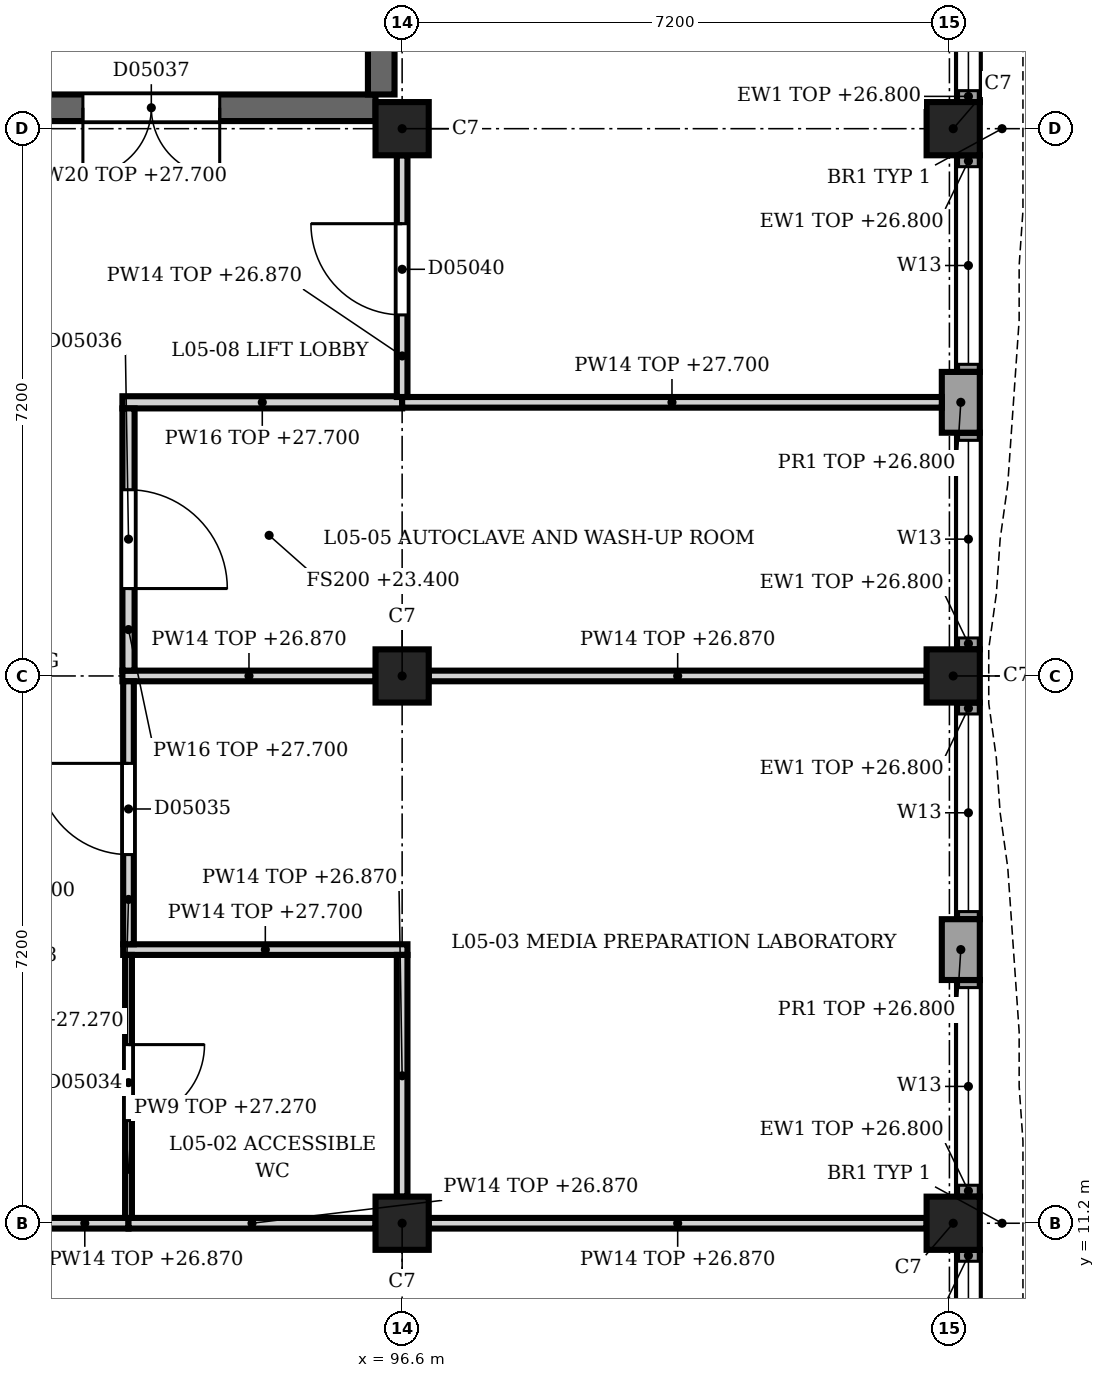
"""IFC4 building model, lengths in metres.
Left out: names, types, materials, properties, quantities, classifications, styles, units other than length and angle.
Written with IfcOpenShell. Run it as: python <this file> out.ifc"""

import sys

from ifc_helpers import new_model, si_unit, direction, frame, frame_2d, origin, origin_2d, place, context, subcontext, project, spatial, rectangle, extrude, element, fill, save


model = new_model("IFC4")
c1 = context("Model", 3, precision=1e-05, world=origin(), true_north=direction((0.0, 1.0)))
c2 = subcontext(c1, "Body", "Model", "MODEL_VIEW")
j1 = project(units=[si_unit("LENGTHUNIT", "METRE"), si_unit("PLANEANGLEUNIT", "RADIAN")], contexts=[c1])
p1 = place(None, origin())
s1 = spatial("IfcSite", under=j1, at=p1, CompositionType="ELEMENT")
p2 = place(p1, origin())
s2 = spatial("IfcBuilding", under=s1, at=p2, CompositionType="ELEMENT")
p3 = place(p2, frame((0.0, 0.0, 23.4)))
s3 = spatial("IfcBuildingStorey", under=s2, at=p3, CompositionType="ELEMENT", Elevation=23.4)
for number, where, z_axis, x_axis in (
    (1, (96.6, 11.2, 0.0), (0.0, 0.0, 1.0), (1.0, 0.0, 0.0)),
    (2, (96.6, 18.4, 0.0), (0.0, 0.0, 1.0), (1.0, 0.0, 0.0)),
    (3, (96.6, 25.6, 0.0), (0.0, 0.0, 1.0), (1.0, 0.0, 0.0)),
    (4, (103.85, 11.2, 0.0), (0.0, 0.0, 1.0), (1.0, 0.0, 0.0)),
    (5, (103.85, 18.4, 0.0), (0.0, 0.0, 1.0), (1.0, 0.0, 0.0)),
    (6, (103.85, 25.6, 0.0), (0.0, 0.0, 1.0), (1.0, 0.0, 0.0)),
):
    element("IfcColumn", number, at=place(p3, frame(where, z_axis=z_axis, x_axis=x_axis)), inside=s3, PredefinedType="COLUMN", context=c2, shape_type="SweptSolid", body=[
        extrude(rectangle(XDim=0.7, YDim=0.7, at=origin_2d()), origin(), (0.0, 0.0, 1.0), 4.5),
    ])
p4 = place(p3, frame((103.95, 22.4, 0.0), z_axis=(0.0, 0.0, 1.0), x_axis=(0.0, -1.0, 0.0)))
e7 = element("IfcWall", 7, at=p4, inside=s3, PredefinedType="SOLIDWALL", context=c2, shape_type="SweptSolid", body=[
    extrude(rectangle(XDim=0.8, YDim=0.5, at=frame_2d((0.4, 0.0))), origin(), (0.0, 0.0, 1.0), 3.4),
])
p5 = place(p3, frame((103.95, 15.2, 0.0), z_axis=(0.0, 0.0, 1.0), x_axis=(0.0, -1.0, 0.0)))
e8 = element("IfcWall", 8, at=p5, inside=s3, PredefinedType="SOLIDWALL", context=c2, shape_type="SweptSolid", body=[
    extrude(rectangle(XDim=0.8, YDim=0.5, at=frame_2d((0.4, 0.0))), origin(), (0.0, 0.0, 1.0), 3.4),
])
p6 = place(p3, frame((104.05, 28.8, 0.0), z_axis=(0.0, 0.0, 1.0), x_axis=(0.0, -1.0, 0.0)))
e9 = element("IfcWall", 9, at=p6, inside=s3, PredefinedType="SOLIDWALL", context=c2, shape_type="SweptSolid", body=[
    extrude(rectangle(XDim=2.85, YDim=0.3, at=frame_2d((1.425, 0.0))), origin(), (0.0, 0.0, 1.0), 3.4),
])
p7 = place(p6, frame((0.1, 0.0, 0.9)))
e10 = element("IfcOpeningElement", 10, at=p7, cuts=e9, PredefinedType="OPENING", context=c2, shape_type="SweptSolid", body=[
    extrude(rectangle(XDim=2.6, YDim=2.2, at=frame_2d((1.3, 1.1))), frame((0.0, 0.16, 0.0), z_axis=(0.0, -1.0, 0.0), x_axis=(1.0, 0.0, 0.0)), (0.0, 0.0, 1.0), 0.32),
])
p8 = place(p3, frame((104.05, 25.25, 0.0), z_axis=(0.0, 0.0, 1.0), x_axis=(0.0, -1.0, 0.0)))
e11 = element("IfcWall", 11, at=p8, inside=s3, PredefinedType="SOLIDWALL", context=c2, shape_type="SweptSolid", body=[
    extrude(rectangle(XDim=2.85, YDim=0.3, at=frame_2d((1.425, 0.0))), origin(), (0.0, 0.0, 1.0), 3.4),
])
p9 = place(p8, frame((0.15, 0.0, 0.9)))
e12 = element("IfcOpeningElement", 12, at=p9, cuts=e11, PredefinedType="OPENING", context=c2, shape_type="SweptSolid", body=[
    extrude(rectangle(XDim=2.6, YDim=2.2, at=frame_2d((1.3, 1.1))), frame((0.0, 0.16, 0.0), z_axis=(0.0, -1.0, 0.0), x_axis=(1.0, 0.0, 0.0)), (0.0, 0.0, 1.0), 0.32),
])
p10 = place(p3, frame((104.05, 21.6, 0.0), z_axis=(0.0, 0.0, 1.0), x_axis=(0.0, -1.0, 0.0)))
e13 = element("IfcWall", 13, at=p10, inside=s3, PredefinedType="SOLIDWALL", context=c2, shape_type="SweptSolid", body=[
    extrude(rectangle(XDim=2.85, YDim=0.3, at=frame_2d((1.425, 0.0))), origin(), (0.0, 0.0, 1.0), 3.4),
])
p11 = place(p10, frame((0.1, 0.0, 0.9)))
e14 = element("IfcOpeningElement", 14, at=p11, cuts=e13, PredefinedType="OPENING", context=c2, shape_type="SweptSolid", body=[
    extrude(rectangle(XDim=2.6, YDim=2.2, at=frame_2d((1.3, 1.1))), frame((0.0, 0.16, 0.0), z_axis=(0.0, -1.0, 0.0), x_axis=(1.0, 0.0, 0.0)), (0.0, 0.0, 1.0), 0.32),
])
p12 = place(p3, frame((104.05, 18.05, 0.0), z_axis=(0.0, 0.0, 1.0), x_axis=(0.0, -1.0, 0.0)))
e15 = element("IfcWall", 15, at=p12, inside=s3, PredefinedType="SOLIDWALL", context=c2, shape_type="SweptSolid", body=[
    extrude(rectangle(XDim=2.85, YDim=0.3, at=frame_2d((1.425, 0.0))), origin(), (0.0, 0.0, 1.0), 3.4),
])
p13 = place(p12, frame((0.15, 0.0, 0.9)))
e16 = element("IfcOpeningElement", 16, at=p13, cuts=e15, PredefinedType="OPENING", context=c2, shape_type="SweptSolid", body=[
    extrude(rectangle(XDim=2.6, YDim=2.2, at=frame_2d((1.3, 1.1))), frame((0.0, 0.16, 0.0), z_axis=(0.0, -1.0, 0.0), x_axis=(1.0, 0.0, 0.0)), (0.0, 0.0, 1.0), 0.32),
])
p14 = place(p3, frame((104.05, 14.4, 0.0), z_axis=(0.0, 0.0, 1.0), x_axis=(0.0, -1.0, 0.0)))
e17 = element("IfcWall", 17, at=p14, inside=s3, PredefinedType="SOLIDWALL", context=c2, shape_type="SweptSolid", body=[
    extrude(rectangle(XDim=2.85, YDim=0.3, at=frame_2d((1.425, 0.0))), origin(), (0.0, 0.0, 1.0), 3.4),
])
p15 = place(p14, frame((0.1, 0.0, 0.9)))
e18 = element("IfcOpeningElement", 18, at=p15, cuts=e17, PredefinedType="OPENING", context=c2, shape_type="SweptSolid", body=[
    extrude(rectangle(XDim=2.6, YDim=2.2, at=frame_2d((1.3, 1.1))), frame((0.0, 0.16, 0.0), z_axis=(0.0, -1.0, 0.0), x_axis=(1.0, 0.0, 0.0)), (0.0, 0.0, 1.0), 0.32),
])
p16 = place(p3, frame((104.05, 10.85, 0.0), z_axis=(0.0, 0.0, 1.0), x_axis=(0.0, -1.0, 0.0)))
e19 = element("IfcWall", 19, at=p16, inside=s3, PredefinedType="SOLIDWALL", context=c2, shape_type="SweptSolid", body=[
    extrude(rectangle(XDim=2.85, YDim=0.3, at=frame_2d((1.425, 0.0))), origin(), (0.0, 0.0, 1.0), 3.4),
])
p17 = place(p16, frame((0.15, 0.0, 0.9)))
e20 = element("IfcOpeningElement", 20, at=p17, cuts=e19, PredefinedType="OPENING", context=c2, shape_type="SweptSolid", body=[
    extrude(rectangle(XDim=2.6, YDim=2.2, at=frame_2d((1.3, 1.1))), frame((0.0, 0.16, 0.0), z_axis=(0.0, -1.0, 0.0), x_axis=(1.0, 0.0, 0.0)), (0.0, 0.0, 1.0), 0.32),
])
p18 = place(p3, frame((89.75, 25.875, 0.0), z_axis=(0.0, 0.0, 1.0), x_axis=(1.0, 0.0, 0.0)))
e21 = element("IfcWall", 21, at=p18, inside=s3, PredefinedType="SHEAR", context=c2, shape_type="SweptSolid", body=[
    extrude(rectangle(XDim=6.5, YDim=0.35, at=frame_2d((3.25, 0.0))), origin(), (0.0, 0.0, 1.0), 4.3),
])
p19 = place(p18, frame((2.65, 0.0, 0.0)))
e22 = element("IfcOpeningElement", 22, at=p19, cuts=e21, PredefinedType="OPENING", context=c2, shape_type="SweptSolid", body=[
    extrude(rectangle(XDim=1.8, YDim=2.1, at=frame_2d((0.9, 1.05))), frame((0.0, 0.185, 0.0), z_axis=(0.0, -1.0, 0.0), x_axis=(1.0, 0.0, 0.0)), (0.0, 0.0, 1.0), 0.37),
])
p20 = place(p3, frame((96.325, 26.05, 0.0), z_axis=(0.0, 0.0, 1.0), x_axis=(0.0, 1.0, 0.0)))
e23 = element("IfcWall", 23, at=p20, inside=s3, PredefinedType="SHEAR", context=c2, shape_type="SweptSolid", body=[
    extrude(rectangle(XDim=6.3, YDim=0.35, at=frame_2d((3.15, 0.0))), origin(), (0.0, 0.0, 1.0), 4.3),
])
p21 = place(p3, frame((93.0, 11.2, 0.0), z_axis=(0.0, 0.0, 1.0), x_axis=(-1.0, 0.0, 0.0)))
e24 = element("IfcWall", 24, at=p21, inside=s3, PredefinedType="PARTITIONING", context=c2, shape_type="SweptSolid", body=[
    extrude(rectangle(XDim=3.25, YDim=0.14, at=frame_2d((1.625, 0.0))), origin(), (0.0, 0.0, 1.0), 3.47),
])
p22 = place(p21, frame((1.15, 0.0, 0.0)))
e25 = element("IfcOpeningElement", 25, at=p22, cuts=e24, PredefinedType="OPENING", context=c2, shape_type="SweptSolid", body=[
    extrude(rectangle(XDim=1.2, YDim=2.2, at=frame_2d((0.6, 1.1))), frame((0.0, 0.08, 0.0), z_axis=(0.0, -1.0, 0.0), x_axis=(1.0, 0.0, 0.0)), (0.0, 0.0, 1.0), 0.16),
])
p23 = place(p3, frame((93.0, 11.2, 0.0), z_axis=(0.0, 0.0, 1.0), x_axis=(1.0, 0.0, 0.0)))
e26 = element("IfcWall", 26, at=p23, inside=s3, PredefinedType="PARTITIONING", context=c2, shape_type="SweptSolid", body=[
    extrude(rectangle(XDim=3.25, YDim=0.14, at=frame_2d((1.625, 0.0))), origin(), (0.0, 0.0, 1.0), 3.47),
])
p24 = place(p3, frame((96.95, 11.2, 0.0), z_axis=(0.0, 0.0, 1.0), x_axis=(1.0, 0.0, 0.0)))
e27 = element("IfcWall", 27, at=p24, inside=s3, PredefinedType="PARTITIONING", context=c2, shape_type="SweptSolid", body=[
    extrude(rectangle(XDim=6.55, YDim=0.14, at=frame_2d((3.275, 0.0))), origin(), (0.0, 0.0, 1.0), 3.47),
])
p25 = place(p3, frame((92.93, 14.8, 0.0), z_axis=(0.0, 0.0, 1.0), x_axis=(1.0, 0.0, 0.0)))
e28 = element("IfcWall", 28, at=p25, inside=s3, PredefinedType="PARTITIONING", context=c2, shape_type="SweptSolid", body=[
    extrude(rectangle(XDim=3.74, YDim=0.14, at=frame_2d((1.87, 0.0))), origin(), (0.0, 0.0, 1.0), 4.3),
])
p26 = place(p3, frame((92.92, 18.4, 0.0), z_axis=(0.0, 0.0, 1.0), x_axis=(1.0, 0.0, 0.0)))
e29 = element("IfcWall", 29, at=p26, inside=s3, PredefinedType="PARTITIONING", context=c2, shape_type="SweptSolid", body=[
    extrude(rectangle(XDim=3.33, YDim=0.14, at=frame_2d((1.665, 0.0))), origin(), (0.0, 0.0, 1.0), 3.47),
])
p27 = place(p3, frame((96.95, 18.4, 0.0), z_axis=(0.0, 0.0, 1.0), x_axis=(1.0, 0.0, 0.0)))
e30 = element("IfcWall", 30, at=p27, inside=s3, PredefinedType="PARTITIONING", context=c2, shape_type="SweptSolid", body=[
    extrude(rectangle(XDim=6.55, YDim=0.14, at=frame_2d((3.275, 0.0))), origin(), (0.0, 0.0, 1.0), 3.47),
])
p28 = place(p3, frame((92.92, 22.0, 0.0), z_axis=(0.0, 0.0, 1.0), x_axis=(1.0, 0.0, 0.0)))
e31 = element("IfcWall", 31, at=p28, inside=s3, PredefinedType="PARTITIONING", context=c2, shape_type="SweptSolid", body=[
    extrude(rectangle(XDim=3.68, YDim=0.16, at=frame_2d((1.84, 0.0))), origin(), (0.0, 0.0, 1.0), 4.3),
])
p29 = place(p3, frame((96.6, 22.0, 0.0), z_axis=(0.0, 0.0, 1.0), x_axis=(1.0, 0.0, 0.0)))
e32 = element("IfcWall", 32, at=p29, inside=s3, PredefinedType="PARTITIONING", context=c2, shape_type="SweptSolid", body=[
    extrude(rectangle(XDim=7.1, YDim=0.14, at=frame_2d((3.55, 0.0))), origin(), (0.0, 0.0, 1.0), 4.3),
])
p30 = place(p3, frame((93.0, 14.73, 0.0), z_axis=(0.0, 0.0, 1.0), x_axis=(0.0, -1.0, 0.0)))
e33 = element("IfcWall", 33, at=p30, inside=s3, PredefinedType="PARTITIONING", context=c2, shape_type="SweptSolid", body=[
    extrude(rectangle(XDim=3.46, YDim=0.09, at=frame_2d((1.73, 0.0))), origin(), (0.0, 0.0, 1.0), 3.87),
])
p31 = place(p30, frame((1.18, 0.0, 0.0)))
e34 = element("IfcOpeningElement", 34, at=p31, cuts=e33, PredefinedType="OPENING", context=c2, shape_type="SweptSolid", body=[
    extrude(rectangle(XDim=1.0, YDim=2.2, at=frame_2d((0.5, 1.1))), frame((0.0, 0.055, 0.0), z_axis=(0.0, -1.0, 0.0), x_axis=(1.0, 0.0, 0.0)), (0.0, 0.0, 1.0), 0.11),
])
p32 = place(p3, frame((93.0, 18.33, 0.0), z_axis=(0.0, 0.0, 1.0), x_axis=(0.0, -1.0, 0.0)))
e35 = element("IfcWall", 35, at=p32, inside=s3, PredefinedType="PARTITIONING", context=c2, shape_type="SweptSolid", body=[
    extrude(rectangle(XDim=3.46, YDim=0.14, at=frame_2d((1.73, 0.0))), origin(), (0.0, 0.0, 1.0), 3.87),
])
p33 = place(p32, frame((1.08, 0.0, 0.0)))
e36 = element("IfcOpeningElement", 36, at=p33, cuts=e35, PredefinedType="OPENING", context=c2, shape_type="SweptSolid", body=[
    extrude(rectangle(XDim=1.2, YDim=2.1, at=frame_2d((0.6, 1.05))), frame((0.0, 0.08, 0.0), z_axis=(0.0, -1.0, 0.0), x_axis=(1.0, 0.0, 0.0)), (0.0, 0.0, 1.0), 0.16),
])
p34 = place(p3, frame((93.0, 21.92, 0.0), z_axis=(0.0, 0.0, 1.0), x_axis=(0.0, -1.0, 0.0)))
e37 = element("IfcWall", 37, at=p34, inside=s3, PredefinedType="PARTITIONING", context=c2, shape_type="SweptSolid", body=[
    extrude(rectangle(XDim=3.45, YDim=0.16, at=frame_2d((1.725, 0.0))), origin(), (0.0, 0.0, 1.0), 4.3),
])
p35 = place(p34, frame((1.07, 0.0, 0.0)))
e38 = element("IfcOpeningElement", 38, at=p35, cuts=e37, PredefinedType="OPENING", context=c2, shape_type="SweptSolid", body=[
    extrude(rectangle(XDim=1.3, YDim=2.2, at=frame_2d((0.65, 1.1))), frame((0.0, 0.09, 0.0), z_axis=(0.0, -1.0, 0.0), x_axis=(1.0, 0.0, 0.0)), (0.0, 0.0, 1.0), 0.18),
])
p36 = place(p3, frame((96.6, 11.55, 0.0), z_axis=(0.0, 0.0, 1.0), x_axis=(0.0, 1.0, 0.0)))
e39 = element("IfcWall", 39, at=p36, inside=s3, PredefinedType="PARTITIONING", context=c2, shape_type="SweptSolid", body=[
    extrude(rectangle(XDim=3.18, YDim=0.14, at=frame_2d((1.59, 0.0))), origin(), (0.0, 0.0, 1.0), 3.47),
])
p37 = place(p3, frame((96.6, 25.25, 0.0), z_axis=(0.0, 0.0, 1.0), x_axis=(0.0, -1.0, 0.0)))
e40 = element("IfcWall", 40, at=p37, inside=s3, PredefinedType="PARTITIONING", context=c2, shape_type="SweptSolid", body=[
    extrude(rectangle(XDim=3.18, YDim=0.14, at=frame_2d((1.59, 0.0))), origin(), (0.0, 0.0, 1.0), 3.47),
])
p38 = place(p37, frame((0.9, 0.0, 0.0)))
e41 = element("IfcOpeningElement", 41, at=p38, cuts=e40, PredefinedType="OPENING", context=c2, shape_type="SweptSolid", body=[
    extrude(rectangle(XDim=1.2, YDim=2.2, at=frame_2d((0.6, 1.1))), frame((0.0, 0.08, 0.0), z_axis=(0.0, -1.0, 0.0), x_axis=(1.0, 0.0, 0.0)), (0.0, 0.0, 1.0), 0.16),
])
p39 = place(p7, origin())
e42 = element("IfcWindow", 42, at=p39, inside=s3, PartitioningType="SINGLE_PANEL", PredefinedType="WINDOW", context=c2, shape_type="SweptSolid", body=[
    extrude(rectangle(XDim=2.6, YDim=2.2, at=frame_2d((1.3, 1.1))), frame((0.0, 0.03, 0.0), z_axis=(0.0, -1.0, 0.0), x_axis=(1.0, 0.0, 0.0)), (0.0, 0.0, 1.0), 0.06),
])
fill(e10, e42)
p40 = place(p9, origin())
e43 = element("IfcWindow", 43, at=p40, inside=s3, PartitioningType="SINGLE_PANEL", PredefinedType="WINDOW", context=c2, shape_type="SweptSolid", body=[
    extrude(rectangle(XDim=2.6, YDim=2.2, at=frame_2d((1.3, 1.1))), frame((0.0, 0.03, 0.0), z_axis=(0.0, -1.0, 0.0), x_axis=(1.0, 0.0, 0.0)), (0.0, 0.0, 1.0), 0.06),
])
fill(e12, e43)
p41 = place(p11, origin())
e44 = element("IfcWindow", 44, at=p41, inside=s3, PartitioningType="SINGLE_PANEL", PredefinedType="WINDOW", context=c2, shape_type="SweptSolid", body=[
    extrude(rectangle(XDim=2.6, YDim=2.2, at=frame_2d((1.3, 1.1))), frame((0.0, 0.03, 0.0), z_axis=(0.0, -1.0, 0.0), x_axis=(1.0, 0.0, 0.0)), (0.0, 0.0, 1.0), 0.06),
])
fill(e14, e44)
p42 = place(p13, origin())
e45 = element("IfcWindow", 45, at=p42, inside=s3, PartitioningType="SINGLE_PANEL", PredefinedType="WINDOW", context=c2, shape_type="SweptSolid", body=[
    extrude(rectangle(XDim=2.6, YDim=2.2, at=frame_2d((1.3, 1.1))), frame((0.0, 0.03, 0.0), z_axis=(0.0, -1.0, 0.0), x_axis=(1.0, 0.0, 0.0)), (0.0, 0.0, 1.0), 0.06),
])
fill(e16, e45)
p43 = place(p15, origin())
e46 = element("IfcWindow", 46, at=p43, inside=s3, PartitioningType="SINGLE_PANEL", PredefinedType="WINDOW", context=c2, shape_type="SweptSolid", body=[
    extrude(rectangle(XDim=2.6, YDim=2.2, at=frame_2d((1.3, 1.1))), frame((0.0, 0.03, 0.0), z_axis=(0.0, -1.0, 0.0), x_axis=(1.0, 0.0, 0.0)), (0.0, 0.0, 1.0), 0.06),
])
fill(e18, e46)
p44 = place(p17, origin())
e47 = element("IfcWindow", 47, at=p44, inside=s3, PartitioningType="SINGLE_PANEL", PredefinedType="WINDOW", context=c2, shape_type="SweptSolid", body=[
    extrude(rectangle(XDim=2.6, YDim=2.2, at=frame_2d((1.3, 1.1))), frame((0.0, 0.03, 0.0), z_axis=(0.0, -1.0, 0.0), x_axis=(1.0, 0.0, 0.0)), (0.0, 0.0, 1.0), 0.06),
])
fill(e20, e47)
p45 = place(p19, origin())
e48 = element("IfcDoor", 48, at=p45, inside=s3, OperationType="SINGLE_SWING_LEFT", PredefinedType="DOOR", context=c2, shape_type="SweptSolid", body=[
    extrude(rectangle(XDim=1.8, YDim=2.1, at=frame_2d((0.9, 1.05))), frame((0.0, 0.025, 0.0), z_axis=(0.0, -1.0, 0.0), x_axis=(1.0, 0.0, 0.0)), (0.0, 0.0, 1.0), 0.05),
])
fill(e22, e48)
p46 = place(p31, origin())
e49 = element("IfcDoor", 49, at=p46, inside=s3, OperationType="SINGLE_SWING_LEFT", PredefinedType="DOOR", context=c2, shape_type="SweptSolid", body=[
    extrude(rectangle(XDim=1.0, YDim=2.2, at=frame_2d((0.5, 1.1))), frame((0.0, 0.025, 0.0), z_axis=(0.0, -1.0, 0.0), x_axis=(1.0, 0.0, 0.0)), (0.0, 0.0, 1.0), 0.05),
])
fill(e34, e49)
p47 = place(p33, origin())
e50 = element("IfcDoor", 50, at=p47, inside=s3, OperationType="SINGLE_SWING_LEFT", PredefinedType="DOOR", context=c2, shape_type="SweptSolid", body=[
    extrude(rectangle(XDim=1.2, YDim=2.1, at=frame_2d((0.6, 1.05))), frame((0.0, 0.025, 0.0), z_axis=(0.0, -1.0, 0.0), x_axis=(1.0, 0.0, 0.0)), (0.0, 0.0, 1.0), 0.05),
])
fill(e36, e50)
p48 = place(p35, origin())
e51 = element("IfcDoor", 51, at=p48, inside=s3, OperationType="SINGLE_SWING_LEFT", PredefinedType="DOOR", context=c2, shape_type="SweptSolid", body=[
    extrude(rectangle(XDim=1.3, YDim=2.2, at=frame_2d((0.65, 1.1))), frame((0.0, 0.025, 0.0), z_axis=(0.0, -1.0, 0.0), x_axis=(1.0, 0.0, 0.0)), (0.0, 0.0, 1.0), 0.05),
])
fill(e38, e51)
p49 = place(p38, origin())
e52 = element("IfcDoor", 52, at=p49, inside=s3, OperationType="SINGLE_SWING_LEFT", PredefinedType="DOOR", context=c2, shape_type="SweptSolid", body=[
    extrude(rectangle(XDim=1.2, YDim=2.2, at=frame_2d((0.6, 1.1))), frame((0.0, 0.025, 0.0), z_axis=(0.0, -1.0, 0.0), x_axis=(1.0, 0.0, 0.0)), (0.0, 0.0, 1.0), 0.05),
])
fill(e41, e52)
save(model, sys.argv[1])
